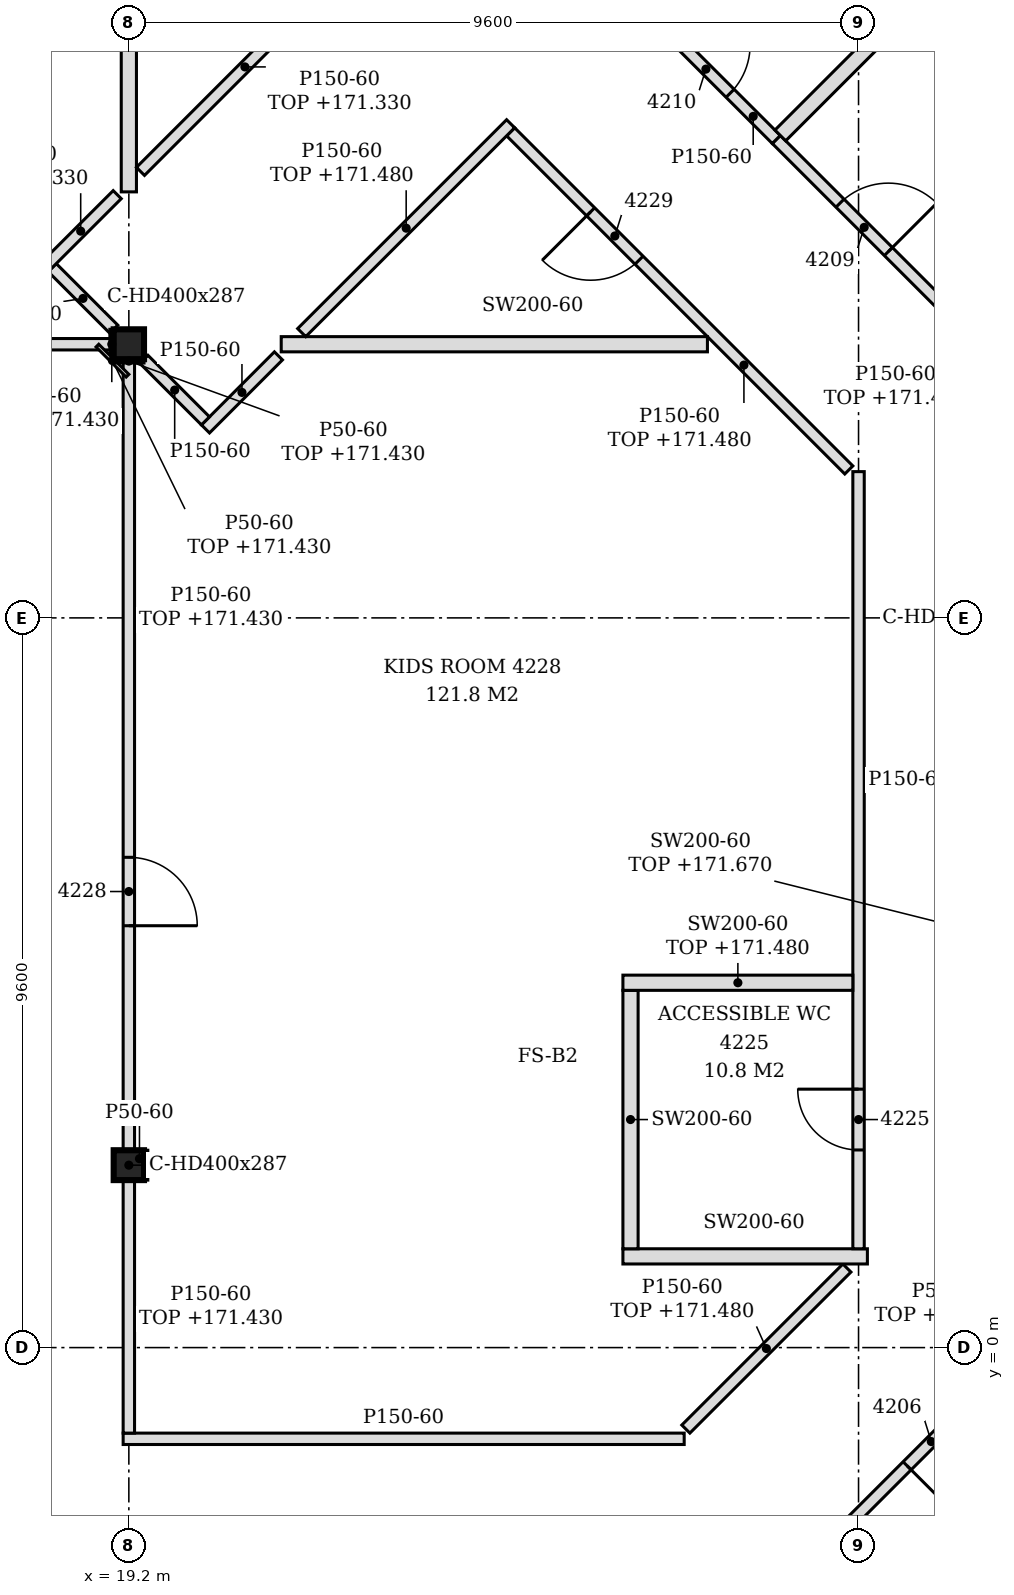
"""IFC4 building model, lengths in metres.
Left out: names, types, materials, properties, quantities, classifications, styles, units other than length and angle.
Written with IfcOpenShell. Run it as: python <this file> out.ifc"""

import sys

from ifc_helpers import new_model, si_unit, direction, frame, frame_2d, origin, origin_2d, place, context, subcontext, project, spatial, polyline, rectangle, i_section, outline, extrude, element, fill, save


model = new_model("IFC4")
c1 = context("Model", 3, precision=1e-05, world=origin(), true_north=direction((0.0, 1.0)))
c2 = subcontext(c1, "Body", "Model", "MODEL_VIEW")
j1 = project(units=[si_unit("LENGTHUNIT", "METRE"), si_unit("PLANEANGLEUNIT", "RADIAN")], contexts=[c1])
p1 = place(None, origin())
s1 = spatial("IfcSite", under=j1, at=p1, CompositionType="ELEMENT")
p2 = place(p1, origin())
s2 = spatial("IfcBuilding", under=s1, at=p2, CompositionType="ELEMENT")
p3 = place(p2, frame((0.0, 0.0, 168.6)))
s3 = spatial("IfcBuildingStorey", under=s2, at=p3, CompositionType="ELEMENT", Elevation=168.6)
for number, where, z_axis, x_axis in (
    (1, (19.2, 2.4, -0.15), (0.0, 0.0, 1.0), (1.0, 0.0, 0.0)),
    (2, (19.2, 13.2, -0.15), (0.0, 0.0, 1.0), (1.0, 0.0, 0.0)),
):
    element("IfcColumn", number, at=place(p3, frame(where, z_axis=z_axis, x_axis=x_axis)), inside=s3, PredefinedType="COLUMN", context=c2, shape_type="SweptSolid", body=[
        extrude(i_section(OverallWidth=0.399, OverallDepth=0.393, WebThickness=0.023, FlangeThickness=0.037, FilletRadius=0.015, at=origin_2d()), origin(), (0.0, 0.0, 1.0), 3.6),
    ])
p4 = place(p3, frame((22.722, -8.272, 0.0), z_axis=(0.0, 0.0, 1.0), x_axis=(0.707106781187, 0.707106781187, 0.0)))
e3 = element("IfcWall", 3, at=p4, inside=s3, PredefinedType="PARTITIONING", context=c2, shape_type="SweptSolid", body=[
    extrude(rectangle(XDim=11.549, YDim=0.15, at=frame_2d((5.774, 0.0))), origin(), (0.0, 0.0, 1.0), 2.88),
])
p5 = place(p4, frame((2.846, 0.0, 0.0)))
e4 = element("IfcOpeningElement", 4, at=p5, cuts=e3, PredefinedType="OPENING", context=c2, shape_type="SweptSolid", body=[
    extrude(rectangle(XDim=0.9, YDim=2.1, at=frame_2d((0.45, 1.05))), frame((0.0, 0.085, 0.0), z_axis=(0.0, -1.0, 0.0), x_axis=(1.0, 0.0, 0.0)), (0.0, 0.0, 1.0), 0.17),
])
p6 = place(p4, frame((6.116, 0.0, 0.0)))
e5 = element("IfcOpeningElement", 5, at=p6, cuts=e3, PredefinedType="OPENING", context=c2, shape_type="SweptSolid", body=[
    extrude(rectangle(XDim=0.9, YDim=2.1, at=frame_2d((0.45, 1.05))), frame((0.0, 0.085, 0.0), z_axis=(0.0, -1.0, 0.0), x_axis=(1.0, 0.0, 0.0)), (0.0, 0.0, 1.0), 0.17),
])
p7 = place(p4, frame((9.499, 0.0, 0.0)))
e6 = element("IfcOpeningElement", 6, at=p7, cuts=e3, PredefinedType="OPENING", context=c2, shape_type="SweptSolid", body=[
    extrude(rectangle(XDim=0.9, YDim=2.1, at=frame_2d((0.45, 1.05))), frame((0.0, 0.085, 0.0), z_axis=(0.0, -1.0, 0.0), x_axis=(1.0, 0.0, 0.0)), (0.0, 0.0, 1.0), 0.17),
])
p8 = place(p3, frame((19.125, -1.2, 0.0), z_axis=(0.0, 0.0, 1.0), x_axis=(1.0, 0.0, 0.0)))
e7 = element("IfcWall", 7, at=p8, inside=s3, PredefinedType="PARTITIONING", context=c2, shape_type="SweptSolid", body=[
    extrude(outline(polyline([(0.0, 0.0), (7.381, 0.0), (7.381, 3.45), (0.225, 3.45), (0.223, 2.83), (0.0, 2.83), (0.0, 0.0)])), frame((0.0, 0.075, 0.0), z_axis=(0.0, -1.0, 0.0), x_axis=(1.0, 0.0, 0.0)), (0.0, 0.0, 1.0), 0.15),
])
p9 = place(p3, frame((19.2, -1.125, 0.0), z_axis=(0.0, 0.0, 1.0), x_axis=(0.0, 1.0, 0.0)))
e8 = element("IfcWall", 8, at=p9, inside=s3, PredefinedType="PARTITIONING", context=c2, shape_type="SweptSolid", body=[
    extrude(rectangle(XDim=3.329, YDim=0.15, at=frame_2d((1.664, 0.0))), origin(), (0.0, 0.0, 1.0), 2.83),
])
p10 = place(p3, frame((26.528, -1.072, 0.0), z_axis=(0.0, 0.0, 1.0), x_axis=(0.707106781187, 0.707106781187, 0.0)))
e9 = element("IfcWall", 9, at=p10, inside=s3, PredefinedType="PARTITIONING", context=c2, shape_type="SweptSolid", body=[
    extrude(rectangle(XDim=2.997, YDim=0.15, at=frame_2d((1.498, 0.0))), origin(), (0.0, 0.0, 1.0), 2.88),
])
p11 = place(p3, frame((25.7, 1.2, 0.0), z_axis=(0.0, 0.0, 1.0), x_axis=(1.0, 0.0, 0.0)))
e10 = element("IfcWall", 10, at=p11, inside=s3, PredefinedType="PARTITIONING", context=c2, shape_type="SweptSolid", body=[
    extrude(rectangle(XDim=3.217, YDim=0.2, at=frame_2d((1.608, 0.0))), origin(), (0.0, 0.0, 1.0), 3.45),
])
p12 = place(p3, frame((25.8, 1.3, 0.0), z_axis=(0.0, 0.0, 1.0), x_axis=(0.0, 1.0, 0.0)))
e11 = element("IfcWall", 11, at=p12, inside=s3, PredefinedType="PARTITIONING", context=c2, shape_type="SweptSolid", body=[
    extrude(outline(polyline([(0.0, 0.0), (3.4, 0.0), (3.4, 2.88), (3.395, 2.88), (3.393, 3.45), (0.0, 3.45), (0.0, 0.0)])), frame((0.0, 0.1, 0.0), z_axis=(0.0, -1.0, 0.0), x_axis=(1.0, 0.0, 0.0)), (0.0, 0.0, 1.0), 0.2),
])
p13 = place(p3, frame((28.8, 1.3, 0.0), z_axis=(0.0, 0.0, 1.0), x_axis=(0.0, 1.0, 0.0)))
e12 = element("IfcWall", 12, at=p13, inside=s3, PredefinedType="PARTITIONING", context=c2, shape_type="SweptSolid", body=[
    extrude(outline(polyline([(0.0, 0.0), (10.224, 0.0), (10.224, 3.45), (8.405, 3.45), (8.403, 2.88), (8.195, 2.88), (8.193, 3.45), (3.605, 3.45), (3.603, 2.88), (3.395, 2.88), (3.393, 3.45), (0.0, 3.45), (0.0, 0.0)])), frame((0.0, 0.075, 0.0), z_axis=(0.0, -1.0, 0.0), x_axis=(1.0, 0.0, 0.0)), (0.0, 0.0, 1.0), 0.15),
])
p14 = place(p13, frame((1.3, 0.0, 0.0)))
e13 = element("IfcOpeningElement", 13, at=p14, cuts=e12, PredefinedType="OPENING", context=c2, shape_type="SweptSolid", body=[
    extrude(rectangle(XDim=0.8, YDim=2.1, at=frame_2d((0.4, 1.05))), frame((0.0, 0.085, 0.0), z_axis=(0.0, -1.0, 0.0), x_axis=(1.0, 0.0, 0.0)), (0.0, 0.0, 1.0), 0.17),
])
p15 = place(p3, frame((19.2, 2.596, 0.0), z_axis=(0.0, 0.0, 1.0), x_axis=(0.0, 1.0, 0.0)))
e14 = element("IfcWall", 14, at=p15, inside=s3, PredefinedType="PARTITIONING", context=c2, shape_type="SweptSolid", body=[
    extrude(rectangle(XDim=10.407, YDim=0.15, at=frame_2d((5.204, 0.0))), origin(), (0.0, 0.0, 1.0), 2.83),
])
p16 = place(p15, frame((2.954, 0.0, 0.0)))
e15 = element("IfcOpeningElement", 15, at=p16, cuts=e14, PredefinedType="OPENING", context=c2, shape_type="SweptSolid", body=[
    extrude(rectangle(XDim=0.9, YDim=2.1, at=frame_2d((0.45, 1.05))), frame((0.0, 0.085, 0.0), z_axis=(0.0, -1.0, 0.0), x_axis=(1.0, 0.0, 0.0)), (0.0, 0.0, 1.0), 0.17),
])
p17 = place(p3, frame((25.7, 4.8, 0.0), z_axis=(0.0, 0.0, 1.0), x_axis=(1.0, 0.0, 0.0)))
e16 = element("IfcWall", 16, at=p17, inside=s3, PredefinedType="PARTITIONING", context=c2, shape_type="SweptSolid", body=[
    extrude(rectangle(XDim=3.025, YDim=0.2, at=frame_2d((1.513, 0.0))), origin(), (0.0, 0.0, 1.0), 2.88),
])
p18 = place(p3, frame((28.672, 11.546, 0.0), z_axis=(0.0, 0.0, 1.0), x_axis=(-0.707106781187, 0.707106781187, 0.0)))
e17 = element("IfcWall", 17, at=p18, inside=s3, PredefinedType="PARTITIONING", context=c2, shape_type="SweptSolid", body=[
    extrude(rectangle(XDim=6.292, YDim=0.15, at=frame_2d((3.146, 0.0))), origin(), (0.0, 0.0, 1.0), 2.88),
])
p19 = place(p18, frame((3.903, 0.0, 0.0)))
e18 = element("IfcOpeningElement", 18, at=p19, cuts=e17, PredefinedType="OPENING", context=c2, shape_type="SweptSolid", body=[
    extrude(rectangle(XDim=0.9, YDim=2.1, at=frame_2d((0.45, 1.05))), frame((0.0, 0.085, 0.0), z_axis=(0.0, -1.0, 0.0), x_axis=(1.0, 0.0, 0.0)), (0.0, 0.0, 1.0), 0.17),
])
p20 = place(p3, frame((20.208, 12.086, 0.0), z_axis=(0.0, 0.0, 1.0), x_axis=(0.706747296365, 0.707466083343, 0.0)))
e19 = element("IfcWall", 19, at=p20, inside=s3, PredefinedType="PARTITIONING", context=c2, shape_type="SweptSolid", body=[
    extrude(rectangle(XDim=1.359, YDim=0.15, at=frame_2d((0.679, 0.0))), origin(), (0.0, 0.0, 1.0), 3.45),
])
p21 = place(p3, frame((20.208, 12.192, 0.0), z_axis=(0.0, 0.0, 1.0), x_axis=(-0.70721334539, 0.707000200921, 0.0)))
e20 = element("IfcWall", 20, at=p21, inside=s3, PredefinedType="PARTITIONING", context=c2, shape_type="SweptSolid", body=[
    extrude(rectangle(XDim=1.146, YDim=0.15, at=frame_2d((0.573, 0.0))), origin(), (0.0, 0.0, 1.0), 3.45),
])
p22 = place(p3, frame((31.072, 12.54, 0.0), z_axis=(0.0, 0.0, 1.0), x_axis=(-0.707106781187, 0.707106781187, 0.0)))
e21 = element("IfcWall", 21, at=p22, inside=s3, PredefinedType="PARTITIONING", context=c2, shape_type="SweptSolid", body=[
    extrude(rectangle(XDim=4.743, YDim=0.15, at=frame_2d((2.372, 0.0))), origin(), (0.0, 0.0, 1.0), 2.88),
])
p23 = place(p22, frame((2.658, 0.0, 0.0)))
e22 = element("IfcOpeningElement", 22, at=p23, cuts=e21, PredefinedType="OPENING", context=c2, shape_type="SweptSolid", body=[
    extrude(rectangle(XDim=0.9, YDim=2.1, at=frame_2d((0.45, 1.05))), frame((0.0, 0.085, 0.0), z_axis=(0.0, -1.0, 0.0), x_axis=(1.0, 0.0, 0.0)), (0.0, 0.0, 1.0), 0.17),
])
p24 = place(p3, frame((7.399, 13.2, 0.0), z_axis=(0.0, 0.0, 1.0), x_axis=(1.0, 0.0, 0.0)))
e23 = element("IfcWall", 23, at=p24, inside=s3, PredefinedType="PARTITIONING", context=c2, shape_type="SweptSolid", body=[
    extrude(rectangle(XDim=11.601, YDim=0.15, at=frame_2d((5.801, 0.0))), origin(), (0.0, 0.0, 1.0), 2.83),
])
p25 = place(p24, frame((5.351, 0.0, 0.0)))
e24 = element("IfcOpeningElement", 24, at=p25, cuts=e23, PredefinedType="OPENING", context=c2, shape_type="SweptSolid", body=[
    extrude(rectangle(XDim=0.9, YDim=2.1, at=frame_2d((0.45, 1.05))), frame((0.0, 0.085, 0.0), z_axis=(0.0, -1.0, 0.0), x_axis=(1.0, 0.0, 0.0)), (0.0, 0.0, 1.0), 0.17),
])
p26 = place(p3, frame((21.205, 13.2, 0.0), z_axis=(0.0, 0.0, 1.0), x_axis=(1.0, 0.0, 0.0)))
e25 = element("IfcWall", 25, at=p26, inside=s3, PredefinedType="PARTITIONING", context=c2, shape_type="SweptSolid", body=[
    extrude(rectangle(XDim=5.607, YDim=0.2, at=frame_2d((2.804, 0.0))), origin(), (0.0, 0.0, 1.0), 3.45),
])
p27 = place(p3, frame((19.002, 13.398, 0.0), z_axis=(0.0, 0.0, 1.0), x_axis=(-0.707000200921, 0.70721334539, 0.0)))
e26 = element("IfcWall", 26, at=p27, inside=s3, PredefinedType="PARTITIONING", context=c2, shape_type="SweptSolid", body=[
    extrude(rectangle(XDim=1.146, YDim=0.15, at=frame_2d((0.573, 0.0))), origin(), (0.0, 0.0, 1.0), 3.45),
])
p28 = place(p3, frame((21.474, 13.353, 0.0), z_axis=(0.0, 0.0, 1.0), x_axis=(0.707200993001, 0.707012556818, 0.0)))
e27 = element("IfcWall", 27, at=p28, inside=s3, PredefinedType="PARTITIONING", context=c2, shape_type="SweptSolid", body=[
    extrude(rectangle(XDim=3.887, YDim=0.15, at=frame_2d((1.943, 0.0))), origin(), (0.0, 0.0, 1.0), 2.88),
])
p29 = place(p3, frame((18.086, 14.208, 0.0), z_axis=(0.0, 0.0, 1.0), x_axis=(0.707466083343, 0.706747296365, 0.0)))
e28 = element("IfcWall", 28, at=p29, inside=s3, PredefinedType="PARTITIONING", context=c2, shape_type="SweptSolid", body=[
    extrude(rectangle(XDim=1.359, YDim=0.15, at=frame_2d((0.679, 0.0))), origin(), (0.0, 0.0, 1.0), 2.73),
])
p30 = place(p3, frame((19.2, 15.205, 0.0), z_axis=(0.0, 0.0, 1.0), x_axis=(0.0, 1.0, 0.0)))
e29 = element("IfcWall", 29, at=p30, inside=s3, PredefinedType="PARTITIONING", context=c2, shape_type="SweptSolid", body=[
    extrude(rectangle(XDim=5.607, YDim=0.2, at=frame_2d((2.804, 0.0))), origin(), (0.0, 0.0, 1.0), 2.73),
])
p31 = place(p3, frame((19.353, 15.474, 0.0), z_axis=(0.0, 0.0, 1.0), x_axis=(0.707012556818, 0.707200993001, 0.0)))
e30 = element("IfcWall", 30, at=p31, inside=s3, PredefinedType="PARTITIONING", context=c2, shape_type="SweptSolid", body=[
    extrude(rectangle(XDim=3.887, YDim=0.15, at=frame_2d((1.943, 0.0))), origin(), (0.0, 0.0, 1.0), 2.73),
])
p32 = place(p3, frame((27.718, 15.894, 0.0), z_axis=(0.0, 0.0, 1.0), x_axis=(-0.707348651109, 0.706864828503, 0.0)))
e31 = element("IfcWall", 31, at=p32, inside=s3, PredefinedType="PARTITIONING", context=c2, shape_type="SweptSolid", body=[
    extrude(rectangle(XDim=2.018, YDim=0.15, at=frame_2d((1.009, 0.0))), origin(), (0.0, 0.0, 1.0), 3.45),
])
p33 = place(p32, frame((0.859, 0.0, 0.0)))
e32 = element("IfcOpeningElement", 32, at=p33, cuts=e31, PredefinedType="OPENING", context=c2, shape_type="SweptSolid", body=[
    extrude(rectangle(XDim=0.9, YDim=2.1, at=frame_2d((0.45, 1.05))), frame((0.0, 0.085, 0.0), z_axis=(0.0, -1.0, 0.0), x_axis=(1.0, 0.0, 0.0)), (0.0, 0.0, 1.0), 0.17),
])
p34 = place(p3, frame((27.771, 15.947, 0.0), z_axis=(0.0, 0.0, 1.0), x_axis=(0.707106781187, 0.707106781187, 0.0)))
e33 = element("IfcWall", 33, at=p34, inside=s3, PredefinedType="PARTITIONING", context=c2, shape_type="SweptSolid", body=[
    extrude(rectangle(XDim=3.401, YDim=0.2, at=frame_2d((1.7, 0.0))), origin(), (0.0, 0.0, 1.0), 3.45),
])
p35 = place(p3, frame((19.425, 2.204, 0.0), z_axis=(0.0, 0.0, 1.0), x_axis=(0.0, 1.0, 0.0)))
e34 = element("IfcWall", 34, at=p35, inside=s3, PredefinedType="PARTITIONING", context=c2, shape_type="SweptSolid", body=[
    extrude(rectangle(XDim=0.393, YDim=0.05, at=frame_2d((0.196, 0.0))), origin(), (0.0, 0.0, 1.0), 3.45),
])
p36 = place(p3, frame((18.976, 13.003, 0.0), z_axis=(0.0, 0.0, 1.0), x_axis=(0.0, 1.0, 0.0)))
e35 = element("IfcWall", 35, at=p36, inside=s3, PredefinedType="PARTITIONING", context=c2, shape_type="SweptSolid", body=[
    extrude(rectangle(XDim=0.393, YDim=0.05, at=frame_2d((0.197, 0.0))), origin(), (0.0, 0.0, 1.0), 2.83),
])
p37 = place(p3, frame((19.182, 12.786, 0.0), z_axis=(0.0, 0.0, 1.0), x_axis=(-0.707106781187, 0.707106781187, 0.0)))
e36 = element("IfcWall", 36, at=p37, inside=s3, PredefinedType="PARTITIONING", context=c2, shape_type="SweptSolid", body=[
    extrude(rectangle(XDim=0.56, YDim=0.05, at=frame_2d((0.28, 0.0))), origin(), (0.0, 0.0, 1.0), 2.83),
])
p38 = place(p3, frame((19.0, 12.979, 0.0), z_axis=(0.0, 0.0, 1.0), x_axis=(1.0, 0.0, 0.0)))
e37 = element("IfcWall", 37, at=p38, inside=s3, PredefinedType="PARTITIONING", context=c2, shape_type="SweptSolid", body=[
    extrude(rectangle(XDim=0.399, YDim=0.05, at=frame_2d((0.199, 0.0))), origin(), (0.0, 0.0, 1.0), 2.83),
])
p39 = place(p7, frame((0.9, 0.0, 0.0), z_axis=(0.0, 0.0, 1.0), x_axis=(-1.0, 0.0, 0.0)))
e38 = element("IfcDoor", 38, at=p39, inside=s3, OperationType="SINGLE_SWING_RIGHT", PredefinedType="DOOR", context=c2, shape_type="SweptSolid", body=[
    extrude(rectangle(XDim=0.9, YDim=2.1, at=frame_2d((0.45, 1.05))), frame((0.0, 0.025, 0.0), z_axis=(0.0, -1.0, 0.0), x_axis=(1.0, 0.0, 0.0)), (0.0, 0.0, 1.0), 0.05),
])
fill(e6, e38)
p40 = place(p23, frame((0.9, 0.0, 0.0), z_axis=(0.0, 0.0, 1.0), x_axis=(-1.0, 0.0, 0.0)))
e39 = element("IfcDoor", 39, at=p40, inside=s3, OperationType="SINGLE_SWING_RIGHT", PredefinedType="DOOR", context=c2, shape_type="SweptSolid", body=[
    extrude(rectangle(XDim=0.9, YDim=2.1, at=frame_2d((0.45, 1.05))), frame((0.0, 0.025, 0.0), z_axis=(0.0, -1.0, 0.0), x_axis=(1.0, 0.0, 0.0)), (0.0, 0.0, 1.0), 0.05),
])
fill(e22, e39)
p41 = place(p33, frame((0.9, 0.0, 0.0), z_axis=(0.0, 0.0, 1.0), x_axis=(-1.0, 0.0, 0.0)))
e40 = element("IfcDoor", 40, at=p41, inside=s3, OperationType="SINGLE_SWING_LEFT", PredefinedType="DOOR", context=c2, shape_type="SweptSolid", body=[
    extrude(rectangle(XDim=0.9, YDim=2.1, at=frame_2d((0.45, 1.05))), frame((0.0, 0.025, 0.0), z_axis=(0.0, -1.0, 0.0), x_axis=(1.0, 0.0, 0.0)), (0.0, 0.0, 1.0), 0.05),
])
fill(e32, e40)
p42 = place(p14, origin())
e41 = element("IfcDoor", 41, at=p42, inside=s3, OperationType="SINGLE_SWING_RIGHT", PredefinedType="DOOR", context=c2, shape_type="SweptSolid", body=[
    extrude(rectangle(XDim=0.8, YDim=2.1, at=frame_2d((0.4, 1.05))), frame((0.0, 0.025, 0.0), z_axis=(0.0, -1.0, 0.0), x_axis=(1.0, 0.0, 0.0)), (0.0, 0.0, 1.0), 0.05),
])
fill(e13, e41)
p43 = place(p16, frame((0.9, 0.0, 0.0), z_axis=(0.0, 0.0, 1.0), x_axis=(-1.0, 0.0, 0.0)))
e42 = element("IfcDoor", 42, at=p43, inside=s3, OperationType="SINGLE_SWING_RIGHT", PredefinedType="DOOR", context=c2, shape_type="SweptSolid", body=[
    extrude(rectangle(XDim=0.9, YDim=2.1, at=frame_2d((0.45, 1.05))), frame((0.0, 0.025, 0.0), z_axis=(0.0, -1.0, 0.0), x_axis=(1.0, 0.0, 0.0)), (0.0, 0.0, 1.0), 0.05),
])
fill(e15, e42)
p44 = place(p19, origin())
e43 = element("IfcDoor", 43, at=p44, inside=s3, OperationType="SINGLE_SWING_RIGHT", PredefinedType="DOOR", context=c2, shape_type="SweptSolid", body=[
    extrude(rectangle(XDim=0.9, YDim=2.1, at=frame_2d((0.45, 1.05))), frame((0.0, 0.025, 0.0), z_axis=(0.0, -1.0, 0.0), x_axis=(1.0, 0.0, 0.0)), (0.0, 0.0, 1.0), 0.05),
])
fill(e18, e43)
save(model, sys.argv[1])
